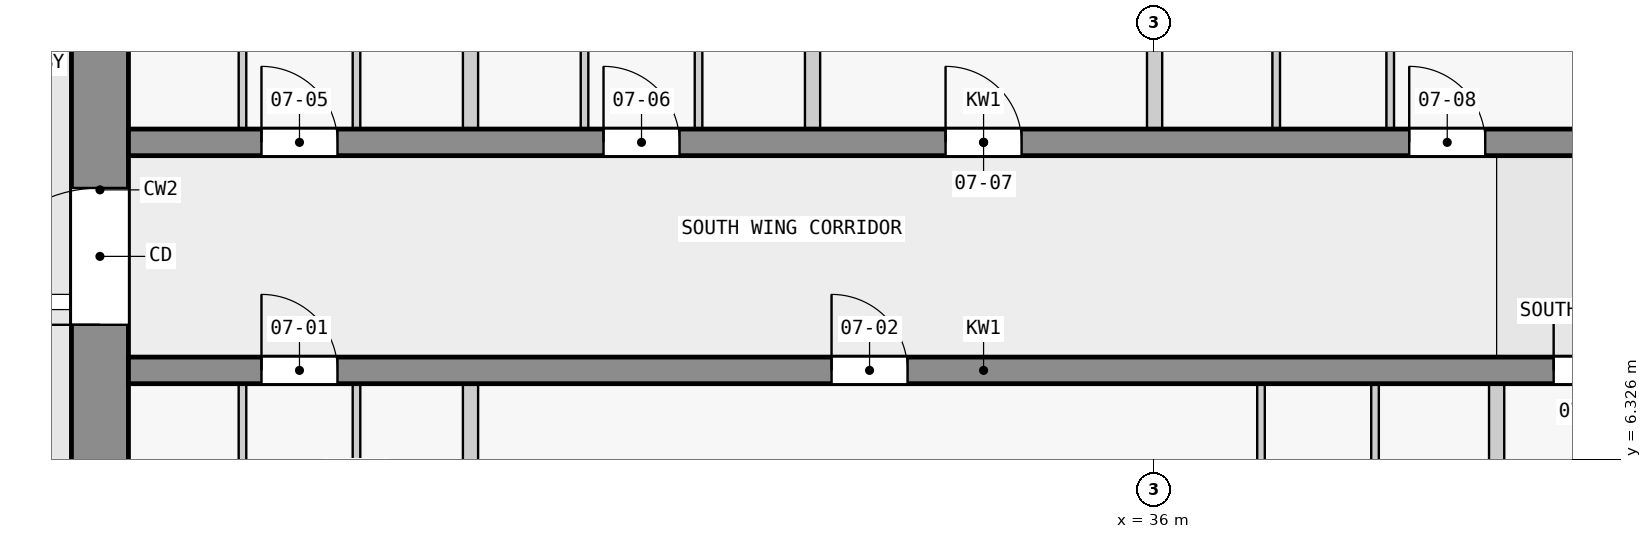
"""IFC4 building model, lengths in metres.
Left out: names, types, materials, properties, quantities, classifications, styles, units other than length and angle.
Written with IfcOpenShell. Run it as: python <this file> out.ifc"""

import sys

from ifc_helpers import new_model, si_unit, direction, frame, frame_2d, origin, place, context, subcontext, project, spatial, rectangle, extrude, element, fill, save


model = new_model("IFC4")
c1 = context("Model", 3, precision=1e-05, world=origin(), true_north=direction((0.0, 1.0)))
c2 = subcontext(c1, "Body", "Model", "MODEL_VIEW")
j1 = project(units=[si_unit("LENGTHUNIT", "METRE"), si_unit("PLANEANGLEUNIT", "RADIAN")], contexts=[c1])
p1 = place(None, origin())
s1 = spatial("IfcSite", under=j1, at=p1, CompositionType="ELEMENT")
p2 = place(p1, origin())
s2 = spatial("IfcBuilding", under=s1, at=p2, CompositionType="ELEMENT")
p3 = place(p2, frame((0.0, 0.0, 33.8)))
s3 = spatial("IfcBuildingStorey", under=s2, at=p3, CompositionType="ELEMENT", Elevation=33.8)
p4 = place(p3, frame((22.125, 2.5, 0.0), z_axis=(0.0, 0.0, 1.0), x_axis=(0.0, 1.0, 0.0)))
e1 = element("IfcWall", 1, at=p4, inside=s3, PredefinedType="SHEAR", context=c2, shape_type="SweptSolid", body=[
    extrude(rectangle(XDim=14.75, YDim=0.75, at=frame_2d((7.375, 0.0))), origin(), (0.0, 0.0, 1.0), 3.25),
])
p5 = place(p4, frame((5.6, 0.0, 0.0)))
e2 = element("IfcOpeningElement", 2, at=p5, cuts=e1, PredefinedType="OPENING", context=c2, shape_type="SweptSolid", body=[
    extrude(rectangle(XDim=1.8, YDim=2.1, at=frame_2d((0.9, 1.05))), frame((0.0, 0.385, 0.0), z_axis=(0.0, -1.0, 0.0), x_axis=(1.0, 0.0, 0.0)), (0.0, 0.0, 1.0), 0.77),
])
p6 = place(p3, frame((22.5, 7.5, 0.0), z_axis=(0.0, 0.0, 1.0), x_axis=(1.0, 0.0, 0.0)))
e3 = element("IfcWall", 3, at=p6, inside=s3, PredefinedType="SHEAR", context=c2, shape_type="SweptSolid", body=[
    extrude(rectangle(XDim=22.5, YDim=0.35, at=frame_2d((11.25, 0.0))), origin(), (0.0, 0.0, 1.0), 3.25),
])
p7 = place(p6, frame((1.75, 0.0, 0.0)))
e4 = element("IfcOpeningElement", 4, at=p7, cuts=e3, PredefinedType="OPENING", context=c2, shape_type="SweptSolid", body=[
    extrude(rectangle(XDim=1.0, YDim=2.1, at=frame_2d((0.5, 1.05))), frame((0.0, 0.185, 0.0), z_axis=(0.0, -1.0, 0.0), x_axis=(1.0, 0.0, 0.0)), (0.0, 0.0, 1.0), 0.37),
])
p8 = place(p6, frame((9.25, 0.0, 0.0)))
e5 = element("IfcOpeningElement", 5, at=p8, cuts=e3, PredefinedType="OPENING", context=c2, shape_type="SweptSolid", body=[
    extrude(rectangle(XDim=1.0, YDim=2.1, at=frame_2d((0.5, 1.05))), frame((0.0, 0.185, 0.0), z_axis=(0.0, -1.0, 0.0), x_axis=(1.0, 0.0, 0.0)), (0.0, 0.0, 1.0), 0.37),
])
p9 = place(p6, frame((18.75, 0.0, 0.0)))
e6 = element("IfcOpeningElement", 6, at=p9, cuts=e3, PredefinedType="OPENING", context=c2, shape_type="SweptSolid", body=[
    extrude(rectangle(XDim=0.9, YDim=2.1, at=frame_2d((0.45, 1.05))), frame((0.0, 0.185, 0.0), z_axis=(0.0, -1.0, 0.0), x_axis=(1.0, 0.0, 0.0)), (0.0, 0.0, 1.0), 0.37),
])
p10 = place(p6, frame((20.95, 0.0, 0.0)))
e7 = element("IfcOpeningElement", 7, at=p10, cuts=e3, PredefinedType="OPENING", context=c2, shape_type="SweptSolid", body=[
    extrude(rectangle(XDim=1.0, YDim=2.1, at=frame_2d((0.5, 1.05))), frame((0.0, 0.185, 0.0), z_axis=(0.0, -1.0, 0.0), x_axis=(1.0, 0.0, 0.0)), (0.0, 0.0, 1.0), 0.37),
])
p11 = place(p3, frame((22.5, 10.5, 0.0), z_axis=(0.0, 0.0, 1.0), x_axis=(1.0, 0.0, 0.0)))
e8 = element("IfcWall", 8, at=p11, inside=s3, PredefinedType="SHEAR", context=c2, shape_type="SweptSolid", body=[
    extrude(rectangle(XDim=22.5, YDim=0.35, at=frame_2d((11.25, 0.0))), origin(), (0.0, 0.0, 1.0), 3.25),
])
p12 = place(p11, frame((1.75, 0.0, 0.0)))
e9 = element("IfcOpeningElement", 9, at=p12, cuts=e8, PredefinedType="OPENING", context=c2, shape_type="SweptSolid", body=[
    extrude(rectangle(XDim=1.0, YDim=2.1, at=frame_2d((0.5, 1.05))), frame((0.0, 0.185, 0.0), z_axis=(0.0, -1.0, 0.0), x_axis=(1.0, 0.0, 0.0)), (0.0, 0.0, 1.0), 0.37),
])
p13 = place(p11, frame((6.25, 0.0, 0.0)))
e10 = element("IfcOpeningElement", 10, at=p13, cuts=e8, PredefinedType="OPENING", context=c2, shape_type="SweptSolid", body=[
    extrude(rectangle(XDim=1.0, YDim=2.1, at=frame_2d((0.5, 1.05))), frame((0.0, 0.185, 0.0), z_axis=(0.0, -1.0, 0.0), x_axis=(1.0, 0.0, 0.0)), (0.0, 0.0, 1.0), 0.37),
])
p14 = place(p11, frame((10.75, 0.0, 0.0)))
e11 = element("IfcOpeningElement", 11, at=p14, cuts=e8, PredefinedType="OPENING", context=c2, shape_type="SweptSolid", body=[
    extrude(rectangle(XDim=1.0, YDim=2.1, at=frame_2d((0.5, 1.05))), frame((0.0, 0.185, 0.0), z_axis=(0.0, -1.0, 0.0), x_axis=(1.0, 0.0, 0.0)), (0.0, 0.0, 1.0), 0.37),
])
p15 = place(p11, frame((16.85, 0.0, 0.0)))
e12 = element("IfcOpeningElement", 12, at=p15, cuts=e8, PredefinedType="OPENING", context=c2, shape_type="SweptSolid", body=[
    extrude(rectangle(XDim=1.0, YDim=2.1, at=frame_2d((0.5, 1.05))), frame((0.0, 0.185, 0.0), z_axis=(0.0, -1.0, 0.0), x_axis=(1.0, 0.0, 0.0)), (0.0, 0.0, 1.0), 0.37),
])
p16 = place(p3, frame((24.0, 3.925, 0.0), z_axis=(0.0, 0.0, 1.0), x_axis=(0.0, 1.0, 0.0)))
e13 = element("IfcWall", 13, at=p16, inside=s3, PredefinedType="PARTITIONING", context=c2, shape_type="SweptSolid", body=[
    extrude(rectangle(XDim=3.4, YDim=0.1, at=frame_2d((1.7, 0.0))), origin(), (0.0, 0.0, 1.0), 3.25),
])
p17 = place(p16, frame((1.25, 0.0, 0.0)))
e14 = element("IfcOpeningElement", 14, at=p17, cuts=e13, PredefinedType="OPENING", context=c2, shape_type="SweptSolid", body=[
    extrude(rectangle(XDim=0.9, YDim=2.1, at=frame_2d((0.45, 1.05))), frame((0.0, 0.06, 0.0), z_axis=(0.0, -1.0, 0.0), x_axis=(1.0, 0.0, 0.0)), (0.0, 0.0, 1.0), 0.12),
])
p18 = place(p3, frame((24.0, 10.675, 0.0), z_axis=(0.0, 0.0, 1.0), x_axis=(0.0, 1.0, 0.0)))
e15 = element("IfcWall", 15, at=p18, inside=s3, PredefinedType="PARTITIONING", context=c2, shape_type="SweptSolid", body=[
    extrude(rectangle(XDim=3.4, YDim=0.1, at=frame_2d((1.7, 0.0))), origin(), (0.0, 0.0, 1.0), 3.25),
])
p19 = place(p18, frame((1.25, 0.0, 0.0)))
e16 = element("IfcOpeningElement", 16, at=p19, cuts=e15, PredefinedType="OPENING", context=c2, shape_type="SweptSolid", body=[
    extrude(rectangle(XDim=0.9, YDim=2.1, at=frame_2d((0.45, 1.05))), frame((0.0, 0.06, 0.0), z_axis=(0.0, -1.0, 0.0), x_axis=(1.0, 0.0, 0.0)), (0.0, 0.0, 1.0), 0.12),
])
p20 = place(p3, frame((25.5, 7.325, 0.0), z_axis=(0.0, 0.0, 1.0), x_axis=(0.0, -1.0, 0.0)))
e17 = element("IfcWall", 17, at=p20, inside=s3, PredefinedType="PARTITIONING", context=c2, shape_type="SweptSolid", body=[
    extrude(rectangle(XDim=3.4, YDim=0.1, at=frame_2d((1.7, 0.0))), origin(), (0.0, 0.0, 1.0), 3.25),
])
p21 = place(p20, frame((1.25, 0.0, 0.0)))
e18 = element("IfcOpeningElement", 18, at=p21, cuts=e17, PredefinedType="OPENING", context=c2, shape_type="SweptSolid", body=[
    extrude(rectangle(XDim=0.9, YDim=2.1, at=frame_2d((0.45, 1.05))), frame((0.0, 0.06, 0.0), z_axis=(0.0, -1.0, 0.0), x_axis=(1.0, 0.0, 0.0)), (0.0, 0.0, 1.0), 0.12),
])
p22 = place(p3, frame((25.5, 14.075, 0.0), z_axis=(0.0, 0.0, 1.0), x_axis=(0.0, -1.0, 0.0)))
e19 = element("IfcWall", 19, at=p22, inside=s3, PredefinedType="PARTITIONING", context=c2, shape_type="SweptSolid", body=[
    extrude(rectangle(XDim=3.4, YDim=0.1, at=frame_2d((1.7, 0.0))), origin(), (0.0, 0.0, 1.0), 3.25),
])
p23 = place(p22, frame((1.25, 0.0, 0.0)))
e20 = element("IfcOpeningElement", 20, at=p23, cuts=e19, PredefinedType="OPENING", context=c2, shape_type="SweptSolid", body=[
    extrude(rectangle(XDim=0.9, YDim=2.1, at=frame_2d((0.45, 1.05))), frame((0.0, 0.06, 0.0), z_axis=(0.0, -1.0, 0.0), x_axis=(1.0, 0.0, 0.0)), (0.0, 0.0, 1.0), 0.12),
])
for number, where, z_axis, x_axis in (
    (21, (27.0, 3.925, 0.0), (0.0, 0.0, 1.0), (0.0, 1.0, 0.0)),
    (22, (27.0, 10.675, 0.0), (0.0, 0.0, 1.0), (0.0, 1.0, 0.0)),
):
    element("IfcWall", number, at=place(p3, frame(where, z_axis=z_axis, x_axis=x_axis)), inside=s3, PredefinedType="PARTITIONING", context=c2, shape_type="SweptSolid", body=[
        extrude(rectangle(XDim=3.4, YDim=0.2, at=frame_2d((1.7, 0.0))), origin(), (0.0, 0.0, 1.0), 3.25),
    ])
p24 = place(p3, frame((28.5, 10.675, 0.0), z_axis=(0.0, 0.0, 1.0), x_axis=(0.0, 1.0, 0.0)))
e23 = element("IfcWall", 23, at=p24, inside=s3, PredefinedType="PARTITIONING", context=c2, shape_type="SweptSolid", body=[
    extrude(rectangle(XDim=3.4, YDim=0.1, at=frame_2d((1.7, 0.0))), origin(), (0.0, 0.0, 1.0), 3.25),
])
p25 = place(p24, frame((1.25, 0.0, 0.0)))
e24 = element("IfcOpeningElement", 24, at=p25, cuts=e23, PredefinedType="OPENING", context=c2, shape_type="SweptSolid", body=[
    extrude(rectangle(XDim=0.9, YDim=2.1, at=frame_2d((0.45, 1.05))), frame((0.0, 0.06, 0.0), z_axis=(0.0, -1.0, 0.0), x_axis=(1.0, 0.0, 0.0)), (0.0, 0.0, 1.0), 0.12),
])
p26 = place(p3, frame((30.0, 14.075, 0.0), z_axis=(0.0, 0.0, 1.0), x_axis=(0.0, -1.0, 0.0)))
e25 = element("IfcWall", 25, at=p26, inside=s3, PredefinedType="PARTITIONING", context=c2, shape_type="SweptSolid", body=[
    extrude(rectangle(XDim=3.4, YDim=0.1, at=frame_2d((1.7, 0.0))), origin(), (0.0, 0.0, 1.0), 3.25),
])
p27 = place(p26, frame((1.25, 0.0, 0.0)))
e26 = element("IfcOpeningElement", 26, at=p27, cuts=e25, PredefinedType="OPENING", context=c2, shape_type="SweptSolid", body=[
    extrude(rectangle(XDim=0.9, YDim=2.1, at=frame_2d((0.45, 1.05))), frame((0.0, 0.06, 0.0), z_axis=(0.0, -1.0, 0.0), x_axis=(1.0, 0.0, 0.0)), (0.0, 0.0, 1.0), 0.12),
])
p28 = place(p3, frame((31.5, 10.675, 0.0), z_axis=(0.0, 0.0, 1.0), x_axis=(0.0, 1.0, 0.0)))
e27 = element("IfcWall", 27, at=p28, inside=s3, PredefinedType="PARTITIONING", context=c2, shape_type="SweptSolid", body=[
    extrude(rectangle(XDim=3.4, YDim=0.2, at=frame_2d((1.7, 0.0))), origin(), (0.0, 0.0, 1.0), 3.25),
])
p29 = place(p3, frame((36.0, 10.675, 0.0), z_axis=(0.0, 0.0, 1.0), x_axis=(0.0, 1.0, 0.0)))
e28 = element("IfcWall", 28, at=p29, inside=s3, PredefinedType="PARTITIONING", context=c2, shape_type="SweptSolid", body=[
    extrude(rectangle(XDim=5.925, YDim=0.2, at=frame_2d((2.962, 0.0))), origin(), (0.0, 0.0, 1.0), 3.25),
])
p30 = place(p3, frame((37.4, 7.325, 0.0), z_axis=(0.0, 0.0, 1.0), x_axis=(0.0, -1.0, 0.0)))
e29 = element("IfcWall", 29, at=p30, inside=s3, PredefinedType="PARTITIONING", context=c2, shape_type="SweptSolid", body=[
    extrude(rectangle(XDim=3.4, YDim=0.1, at=frame_2d((1.7, 0.0))), origin(), (0.0, 0.0, 1.0), 3.25),
])
p31 = place(p30, frame((1.25, 0.0, 0.0)))
e30 = element("IfcOpeningElement", 30, at=p31, cuts=e29, PredefinedType="OPENING", context=c2, shape_type="SweptSolid", body=[
    extrude(rectangle(XDim=0.9, YDim=2.1, at=frame_2d((0.45, 1.05))), frame((0.0, 0.06, 0.0), z_axis=(0.0, -1.0, 0.0), x_axis=(1.0, 0.0, 0.0)), (0.0, 0.0, 1.0), 0.12),
])
for number, where, z_axis, x_axis in (
    (31, (37.6, 10.675, 0.0), (0.0, 0.0, 1.0), (0.0, 1.0, 0.0)),
    (32, (38.9, 3.925, 0.0), (0.0, 0.0, 1.0), (0.0, 1.0, 0.0)),
):
    element("IfcWall", number, at=place(p3, frame(where, z_axis=z_axis, x_axis=x_axis)), inside=s3, PredefinedType="PARTITIONING", context=c2, shape_type="SweptSolid", body=[
        extrude(rectangle(XDim=3.4, YDim=0.1, at=frame_2d((1.7, 0.0))), origin(), (0.0, 0.0, 1.0), 3.25),
    ])
p32 = place(p3, frame((39.1, 10.675, 0.0), z_axis=(0.0, 0.0, 1.0), x_axis=(0.0, 1.0, 0.0)))
e33 = element("IfcWall", 33, at=p32, inside=s3, PredefinedType="PARTITIONING", context=c2, shape_type="SweptSolid", body=[
    extrude(rectangle(XDim=3.4, YDim=0.1, at=frame_2d((1.7, 0.0))), origin(), (0.0, 0.0, 1.0), 3.25),
])
p33 = place(p32, frame((1.25, 0.0, 0.0)))
e34 = element("IfcOpeningElement", 34, at=p33, cuts=e33, PredefinedType="OPENING", context=c2, shape_type="SweptSolid", body=[
    extrude(rectangle(XDim=0.9, YDim=2.1, at=frame_2d((0.45, 1.05))), frame((0.0, 0.06, 0.0), z_axis=(0.0, -1.0, 0.0), x_axis=(1.0, 0.0, 0.0)), (0.0, 0.0, 1.0), 0.12),
])
p34 = place(p3, frame((40.5, 3.925, 0.0), z_axis=(0.0, 0.0, 1.0), x_axis=(0.0, 1.0, 0.0)))
e35 = element("IfcWall", 35, at=p34, inside=s3, PredefinedType="PARTITIONING", context=c2, shape_type="SweptSolid", body=[
    extrude(rectangle(XDim=3.4, YDim=0.2, at=frame_2d((1.7, 0.0))), origin(), (0.0, 0.0, 1.0), 3.25),
])
p35 = place(p5, origin())
e36 = element("IfcDoor", 36, at=p35, inside=s3, OperationType="DOUBLE_DOOR_SINGLE_SWING", PredefinedType="DOOR", context=c2, shape_type="SweptSolid", body=[
    extrude(rectangle(XDim=1.8, YDim=2.1, at=frame_2d((0.9, 1.05))), frame((0.0, 0.025, 0.0), z_axis=(0.0, -1.0, 0.0), x_axis=(1.0, 0.0, 0.0)), (0.0, 0.0, 1.0), 0.05),
])
fill(e2, e36)
p36 = place(p7, origin())
e37 = element("IfcDoor", 37, at=p36, inside=s3, OperationType="SINGLE_SWING_LEFT", PredefinedType="DOOR", context=c2, shape_type="SweptSolid", body=[
    extrude(rectangle(XDim=1.0, YDim=2.1, at=frame_2d((0.5, 1.05))), frame((0.0, 0.025, 0.0), z_axis=(0.0, -1.0, 0.0), x_axis=(1.0, 0.0, 0.0)), (0.0, 0.0, 1.0), 0.05),
])
fill(e4, e37)
p37 = place(p8, origin())
e38 = element("IfcDoor", 38, at=p37, inside=s3, OperationType="SINGLE_SWING_LEFT", PredefinedType="DOOR", context=c2, shape_type="SweptSolid", body=[
    extrude(rectangle(XDim=1.0, YDim=2.1, at=frame_2d((0.5, 1.05))), frame((0.0, 0.025, 0.0), z_axis=(0.0, -1.0, 0.0), x_axis=(1.0, 0.0, 0.0)), (0.0, 0.0, 1.0), 0.05),
])
fill(e5, e38)
p38 = place(p9, origin())
e39 = element("IfcDoor", 39, at=p38, inside=s3, OperationType="SINGLE_SWING_RIGHT", PredefinedType="DOOR", context=c2, shape_type="SweptSolid", body=[
    extrude(rectangle(XDim=0.9, YDim=2.1, at=frame_2d((0.45, 1.05))), frame((0.0, 0.025, 0.0), z_axis=(0.0, -1.0, 0.0), x_axis=(1.0, 0.0, 0.0)), (0.0, 0.0, 1.0), 0.05),
])
fill(e6, e39)
p39 = place(p12, origin())
e40 = element("IfcDoor", 40, at=p39, inside=s3, OperationType="SINGLE_SWING_LEFT", PredefinedType="DOOR", context=c2, shape_type="SweptSolid", body=[
    extrude(rectangle(XDim=1.0, YDim=2.1, at=frame_2d((0.5, 1.05))), frame((0.0, 0.025, 0.0), z_axis=(0.0, -1.0, 0.0), x_axis=(1.0, 0.0, 0.0)), (0.0, 0.0, 1.0), 0.05),
])
fill(e9, e40)
p40 = place(p13, origin())
e41 = element("IfcDoor", 41, at=p40, inside=s3, OperationType="SINGLE_SWING_LEFT", PredefinedType="DOOR", context=c2, shape_type="SweptSolid", body=[
    extrude(rectangle(XDim=1.0, YDim=2.1, at=frame_2d((0.5, 1.05))), frame((0.0, 0.025, 0.0), z_axis=(0.0, -1.0, 0.0), x_axis=(1.0, 0.0, 0.0)), (0.0, 0.0, 1.0), 0.05),
])
fill(e10, e41)
p41 = place(p14, origin())
e42 = element("IfcDoor", 42, at=p41, inside=s3, OperationType="SINGLE_SWING_LEFT", PredefinedType="DOOR", context=c2, shape_type="SweptSolid", body=[
    extrude(rectangle(XDim=1.0, YDim=2.1, at=frame_2d((0.5, 1.05))), frame((0.0, 0.025, 0.0), z_axis=(0.0, -1.0, 0.0), x_axis=(1.0, 0.0, 0.0)), (0.0, 0.0, 1.0), 0.05),
])
fill(e11, e42)
p42 = place(p15, origin())
e43 = element("IfcDoor", 43, at=p42, inside=s3, OperationType="SINGLE_SWING_RIGHT", PredefinedType="DOOR", context=c2, shape_type="SweptSolid", body=[
    extrude(rectangle(XDim=1.0, YDim=2.1, at=frame_2d((0.5, 1.05))), frame((0.0, 0.025, 0.0), z_axis=(0.0, -1.0, 0.0), x_axis=(1.0, 0.0, 0.0)), (0.0, 0.0, 1.0), 0.05),
])
fill(e12, e43)
save(model, sys.argv[1])
